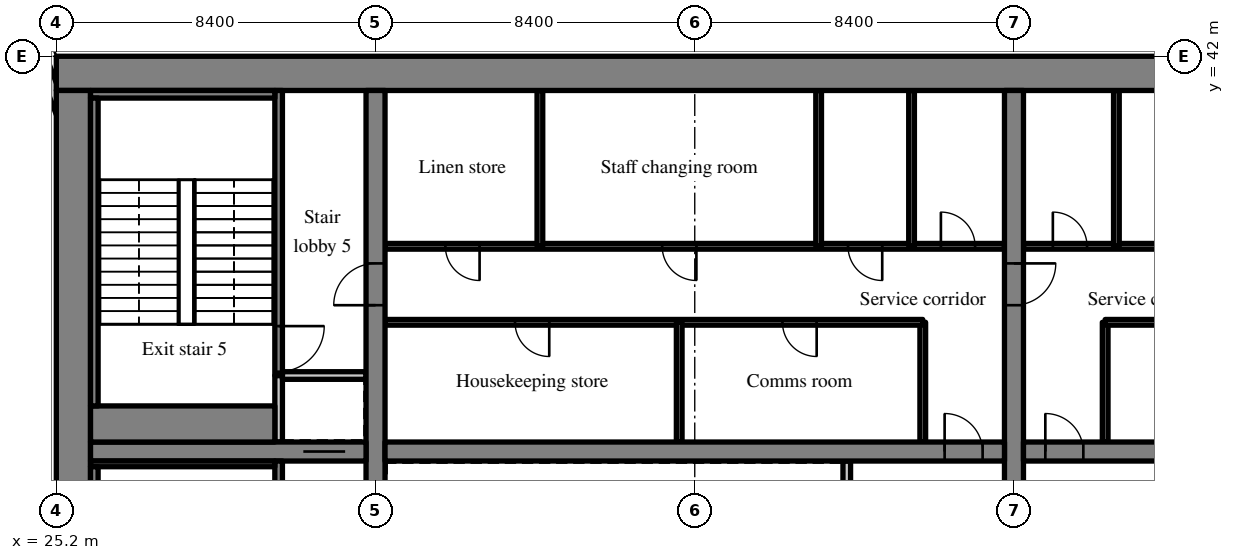
"""IFC4 building model, lengths in metres.
Left out: names, types, materials, properties, quantities, classifications, styles, units other than length and angle.
Written with IfcOpenShell. Run it as: python <this file> out.ifc"""

import sys

from ifc_helpers import new_model, si_unit, direction, frame, frame_2d, origin, place, context, subcontext, project, spatial, rectangle, extrude, source, transform, mapped, element, fill, save


model = new_model("IFC4")
c1 = context("Model", 3, precision=1e-05, world=origin(), true_north=direction((0.0, 1.0)))
c2 = subcontext(c1, "Body", "Model", "MODEL_VIEW")
j1 = project(units=[si_unit("LENGTHUNIT", "METRE"), si_unit("PLANEANGLEUNIT", "RADIAN")], contexts=[c1])
p1 = place(None, origin())
s1 = spatial("IfcSite", under=j1, at=p1, CompositionType="ELEMENT")
p2 = place(p1, origin())
s2 = spatial("IfcBuilding", under=s1, at=p2, CompositionType="ELEMENT")
p3 = place(p2, frame((0.0, 0.0, 99.0)))
s3 = spatial("IfcBuildingStorey", under=s2, at=p3, CompositionType="ELEMENT", Elevation=99.0)
m1 = source(origin(), c2, "Body", "SweptSolid", [
    extrude(rectangle(XDim=50.4, YDim=0.9, at=frame_2d((25.2, 0.0))), origin(), (0.0, 0.0, 1.0), 3.52),
])
p4 = place(p3, frame((25.2, 41.55, 0.0), z_axis=(0.0, 0.0, 1.0), x_axis=(1.0, 0.0, 0.0)))
e1 = element("IfcWall", 1, at=p4, inside=s3, PredefinedType="SHEAR", context=c2, shape_type="MappedRepresentation", body=[
    mapped(m1, transform((0.0, 0.0, 0.0), scale=1.0)),
])
m2 = source(origin(), c2, "Body", "SweptSolid", [
    extrude(rectangle(XDim=18.2, YDim=0.9, at=frame_2d((9.1, 0.0))), origin(), (0.0, 0.0, 1.0), 3.52),
])
p5 = place(p3, frame((25.65, 22.9, 0.0), z_axis=(0.0, 0.0, 1.0), x_axis=(0.0, 1.0, 0.0)))
e2 = element("IfcWall", 2, at=p5, inside=s3, PredefinedType="SHEAR", context=c2, shape_type="MappedRepresentation", body=[
    mapped(m2, transform((0.0, 0.0, 0.0), scale=1.0)),
])
m3 = source(origin(), c2, "Body", "SweptSolid", [
    extrude(rectangle(XDim=18.2, YDim=0.5, at=frame_2d((9.1, 0.0))), origin(), (0.0, 0.0, 1.0), 3.52),
])
p6 = place(p3, frame((33.6, 22.9, 0.0), z_axis=(0.0, 0.0, 1.0), x_axis=(0.0, 1.0, 0.0)))
e3 = element("IfcWall", 3, at=p6, inside=s3, PredefinedType="SHEAR", context=c2, shape_type="MappedRepresentation", body=[
    mapped(m3, transform((0.0, 0.0, 0.0), scale=1.0)),
])
m4 = source(origin(), c2, "Body", "SweptSolid", [
    extrude(rectangle(XDim=1.1, YDim=2.1, at=frame_2d((0.55, 1.05))), frame((0.0, 0.26, 0.0), z_axis=(0.0, -1.0, 0.0), x_axis=(1.0, 0.0, 0.0)), (0.0, 0.0, 1.0), 0.52),
])
p7 = place(p6, frame((12.55, 0.0, 0.0)))
e4 = element("IfcOpeningElement", 4, at=p7, cuts=e3, PredefinedType="OPENING", context=c2, shape_type="MappedRepresentation", body=[
    mapped(m4, transform((0.0, 0.0, 0.0), scale=1.0)),
])
p8 = place(p3, frame((50.4, 22.9, 0.0), z_axis=(0.0, 0.0, 1.0), x_axis=(0.0, 1.0, 0.0)))
e5 = element("IfcWall", 5, at=p8, inside=s3, PredefinedType="SHEAR", context=c2, shape_type="MappedRepresentation", body=[
    mapped(m3, transform((0.0, 0.0, 0.0), scale=1.0)),
])
p9 = place(p8, frame((12.55, 0.0, 0.0)))
e6 = element("IfcOpeningElement", 6, at=p9, cuts=e5, PredefinedType="OPENING", context=c2, shape_type="MappedRepresentation", body=[
    mapped(m4, transform((0.0, 0.0, 0.0), scale=1.0)),
])
m5 = source(origin(), c2, "Body", "SweptSolid", [
    extrude(rectangle(XDim=7.25, YDim=0.5, at=frame_2d((3.625, 0.0))), origin(), (0.0, 0.0, 1.0), 3.52),
])
p10 = place(p3, frame((26.1, 31.6, 0.0), z_axis=(0.0, 0.0, 1.0), x_axis=(1.0, 0.0, 0.0)))
e7 = element("IfcWall", 7, at=p10, inside=s3, PredefinedType="SHEAR", context=c2, shape_type="MappedRepresentation", body=[
    mapped(m5, transform((0.0, 0.0, 0.0), scale=1.0)),
])
p11 = place(p10, frame((5.6, 0.0, 0.0)))
e8 = element("IfcOpeningElement", 8, at=p11, cuts=e7, PredefinedType="OPENING", context=c2, shape_type="MappedRepresentation", body=[
    mapped(m4, transform((0.0, 0.0, 0.0), scale=1.0)),
])
m6 = source(origin(), c2, "Body", "SweptSolid", [
    extrude(rectangle(XDim=16.3, YDim=0.5, at=frame_2d((8.15, 0.0))), origin(), (0.0, 0.0, 1.0), 3.52),
])
p12 = place(p3, frame((33.85, 31.6, 0.0), z_axis=(0.0, 0.0, 1.0), x_axis=(1.0, 0.0, 0.0)))
e9 = element("IfcWall", 9, at=p12, inside=s3, PredefinedType="SHEAR", context=c2, shape_type="MappedRepresentation", body=[
    mapped(m6, transform((0.0, 0.0, 0.0), scale=1.0)),
])
m7 = source(origin(), c2, "Body", "SweptSolid", [
    extrude(rectangle(XDim=1.0, YDim=2.1, at=frame_2d((0.5, 1.05))), frame((0.0, 0.26, 0.0), z_axis=(0.0, -1.0, 0.0), x_axis=(1.0, 0.0, 0.0)), (0.0, 0.0, 1.0), 0.52),
])
p13 = place(p12, frame((14.725, 0.0, 0.0)))
e10 = element("IfcOpeningElement", 10, at=p13, cuts=e9, PredefinedType="OPENING", context=c2, shape_type="MappedRepresentation", body=[
    mapped(m7, transform((0.0, 0.0, 0.0), scale=1.0)),
])
m8 = source(origin(), c2, "Body", "SweptSolid", [
    extrude(rectangle(XDim=16.3, YDim=0.5, at=frame_2d((8.15, 0.0))), origin(), (0.0, 0.0, 1.0), 3.52),
])
p14 = place(p3, frame((50.65, 31.6, 0.0), z_axis=(0.0, 0.0, 1.0), x_axis=(1.0, 0.0, 0.0)))
e11 = element("IfcWall", 11, at=p14, inside=s3, PredefinedType="SHEAR", context=c2, shape_type="MappedRepresentation", body=[
    mapped(m8, transform((0.0, 0.0, 0.0), scale=1.0)),
])
p15 = place(p14, frame((0.575, 0.0, 0.0)))
e12 = element("IfcOpeningElement", 12, at=p15, cuts=e11, PredefinedType="OPENING", context=c2, shape_type="MappedRepresentation", body=[
    mapped(m7, transform((0.0, 0.0, 0.0), scale=1.0)),
])
m9 = source(origin(), c2, "Body", "SweptSolid", [
    extrude(rectangle(XDim=3.559, YDim=0.3, at=frame_2d((1.78, 0.0))), origin(), (0.0, 0.0, 1.0), 3.52),
])
p16 = place(p3, frame((25.55, 39.969, 0.0), z_axis=(0.0, 0.0, 1.0), x_axis=(-0.35779745313, 0.933799219604, 0.0)))
e13 = element("IfcWall", 13, at=p16, inside=s3, PredefinedType="SOLIDWALL", context=c2, shape_type="MappedRepresentation", body=[
    mapped(m9, transform((0.0, 0.0, 0.0), scale=1.0)),
])
m10 = source(origin(), c2, "Body", "SweptSolid", [
    extrude(rectangle(XDim=1.5, YDim=2.0, at=frame_2d((0.75, 1.0))), frame((0.0, 0.16, 0.0), z_axis=(0.0, -1.0, 0.0), x_axis=(1.0, 0.0, 0.0)), (0.0, 0.0, 1.0), 0.32),
])
p17 = place(p16, frame((1.903, 0.0, 0.9)))
e14 = element("IfcOpeningElement", 14, at=p17, cuts=e13, PredefinedType="OPENING", context=c2, shape_type="MappedRepresentation", body=[
    mapped(m10, transform((0.0, 0.0, 0.0), scale=1.0)),
])
m11 = source(origin(), c2, "Body", "SweptSolid", [
    extrude(rectangle(XDim=2.55, YDim=0.2, at=frame_2d((1.275, 0.0))), origin(), (0.0, 0.0, 1.0), 3.52),
])
p18 = place(p3, frame((46.0, 28.8, 0.0), z_axis=(0.0, 0.0, 1.0), x_axis=(0.0, 1.0, 0.0)))
e15 = element("IfcWall", 15, at=p18, inside=s3, PredefinedType="SOLIDWALL", context=c2, shape_type="MappedRepresentation", body=[
    mapped(m11, transform((0.0, 0.0, 0.0), scale=1.0)),
])
m12 = source(origin(), c2, "Body", "SweptSolid", [
    extrude(rectangle(XDim=3.15, YDim=0.15, at=frame_2d((1.575, 0.0))), origin(), (0.0, 0.0, 1.0), 3.52),
])
p19 = place(p3, frame((48.0, 31.85, 0.0), z_axis=(0.0, 0.0, 1.0), x_axis=(0.0, 1.0, 0.0)))
e16 = element("IfcWall", 16, at=p19, inside=s3, PredefinedType="PARTITIONING", context=c2, shape_type="MappedRepresentation", body=[
    mapped(m12, transform((0.0, 0.0, 0.0), scale=1.0)),
])
m13 = source(origin(), c2, "Body", "SweptSolid", [
    extrude(rectangle(XDim=14.15, YDim=0.15, at=frame_2d((7.075, 0.0))), origin(), (0.0, 0.0, 1.0), 3.52),
])
p20 = place(p3, frame((33.85, 35.0, 0.0), z_axis=(0.0, 0.0, 1.0), x_axis=(1.0, 0.0, 0.0)))
e17 = element("IfcWall", 17, at=p20, inside=s3, PredefinedType="PARTITIONING", context=c2, shape_type="MappedRepresentation", body=[
    mapped(m13, transform((0.0, 0.0, 0.0), scale=1.0)),
])
m14 = source(origin(), c2, "Body", "SweptSolid", [
    extrude(rectangle(XDim=0.9, YDim=2.1, at=frame_2d((0.45, 1.05))), frame((0.0, 0.085, 0.0), z_axis=(0.0, -1.0, 0.0), x_axis=(1.0, 0.0, 0.0)), (0.0, 0.0, 1.0), 0.17),
])
p21 = place(p20, frame((3.421, 0.0, 0.0)))
e18 = element("IfcOpeningElement", 18, at=p21, cuts=e17, PredefinedType="OPENING", context=c2, shape_type="MappedRepresentation", body=[
    mapped(m14, transform((0.0, 0.0, 0.0), scale=1.0)),
])
p22 = place(p20, frame((10.458, 0.0, 0.0)))
e19 = element("IfcOpeningElement", 19, at=p22, cuts=e17, PredefinedType="OPENING", context=c2, shape_type="MappedRepresentation", body=[
    mapped(m14, transform((0.0, 0.0, 0.0), scale=1.0)),
])
m15 = source(origin(), c2, "Body", "SweptSolid", [
    extrude(rectangle(XDim=16.3, YDim=0.15, at=frame_2d((8.15, 0.0))), origin(), (0.0, 0.0, 1.0), 3.52),
])
p23 = place(p3, frame((33.85, 37.0, 0.0), z_axis=(0.0, 0.0, 1.0), x_axis=(1.0, 0.0, 0.0)))
e20 = element("IfcWall", 20, at=p23, inside=s3, PredefinedType="PARTITIONING", context=c2, shape_type="MappedRepresentation", body=[
    mapped(m15, transform((0.0, 0.0, 0.0), scale=1.0)),
])
p24 = place(p23, frame((1.588, 0.0, 0.0)))
e21 = element("IfcOpeningElement", 21, at=p24, cuts=e20, PredefinedType="OPENING", context=c2, shape_type="MappedRepresentation", body=[
    mapped(m14, transform((0.0, 0.0, 0.0), scale=1.0)),
])
p25 = place(p23, frame((7.293, 0.0, 0.0)))
e22 = element("IfcOpeningElement", 22, at=p25, cuts=e20, PredefinedType="OPENING", context=c2, shape_type="MappedRepresentation", body=[
    mapped(m14, transform((0.0, 0.0, 0.0), scale=1.0)),
])
p26 = place(p23, frame((12.183, 0.0, 0.0)))
e23 = element("IfcOpeningElement", 23, at=p26, cuts=e20, PredefinedType="OPENING", context=c2, shape_type="MappedRepresentation", body=[
    mapped(m14, transform((0.0, 0.0, 0.0), scale=1.0)),
])
p27 = place(p23, frame((14.627, 0.0, 0.0)))
e24 = element("IfcOpeningElement", 24, at=p27, cuts=e20, PredefinedType="OPENING", context=c2, shape_type="MappedRepresentation", body=[
    mapped(m14, transform((0.0, 0.0, 0.0), scale=1.0)),
])
p28 = place(p3, frame((41.591, 31.85, 0.0), z_axis=(0.0, 0.0, 1.0), x_axis=(0.0, 1.0, 0.0)))
e25 = element("IfcWall", 25, at=p28, inside=s3, PredefinedType="PARTITIONING", context=c2, shape_type="MappedRepresentation", body=[
    mapped(m12, transform((0.0, 0.0, 0.0), scale=1.0)),
])
m16 = source(origin(), c2, "Body", "SweptSolid", [
    extrude(rectangle(XDim=4.1, YDim=0.15, at=frame_2d((2.05, 0.0))), origin(), (0.0, 0.0, 1.0), 3.52),
])
for number, where, z_axis, x_axis in (
    (26, (37.925, 37.0, 0.0), (0.0, 0.0, 1.0), (0.0, 1.0, 0.0)),
    (27, (45.26, 37.0, 0.0), (0.0, 0.0, 1.0), (0.0, 1.0, 0.0)),
    (28, (47.705, 37.0, 0.0), (0.0, 0.0, 1.0), (0.0, 1.0, 0.0)),
):
    element("IfcWall", number, at=place(p3, frame(where, z_axis=z_axis, x_axis=x_axis)), inside=s3, PredefinedType="PARTITIONING", context=c2, shape_type="MappedRepresentation", body=[
        mapped(m16, transform((0.0, 0.0, 0.0), scale=1.0)),
    ])
p29 = place(p3, frame((52.8, 31.85, 0.0), z_axis=(0.0, 0.0, 1.0), x_axis=(0.0, 1.0, 0.0)))
e29 = element("IfcWall", 29, at=p29, inside=s3, PredefinedType="PARTITIONING", context=c2, shape_type="MappedRepresentation", body=[
    mapped(m12, transform((0.0, 0.0, 0.0), scale=1.0)),
])
p30 = place(p3, frame((66.95, 35.0, 0.0), z_axis=(0.0, 0.0, 1.0), x_axis=(-1.0, 0.0, 0.0)))
e30 = element("IfcWall", 30, at=p30, inside=s3, PredefinedType="PARTITIONING", context=c2, shape_type="MappedRepresentation", body=[
    mapped(m13, transform((0.0, 0.0, 0.0), scale=1.0)),
])
p31 = place(p30, frame((6.588, 0.0, 0.0)))
e31 = element("IfcOpeningElement", 31, at=p31, cuts=e30, PredefinedType="OPENING", context=c2, shape_type="MappedRepresentation", body=[
    mapped(m14, transform((0.0, 0.0, 0.0), scale=1.0)),
])
m17 = source(origin(), c2, "Body", "SweptSolid", [
    extrude(rectangle(XDim=16.3, YDim=0.15, at=frame_2d((8.15, 0.0))), origin(), (0.0, 0.0, 1.0), 3.52),
])
p32 = place(p3, frame((66.95, 37.0, 0.0), z_axis=(0.0, 0.0, 1.0), x_axis=(-1.0, 0.0, 0.0)))
e32 = element("IfcWall", 32, at=p32, inside=s3, PredefinedType="PARTITIONING", context=c2, shape_type="MappedRepresentation", body=[
    mapped(m17, transform((0.0, 0.0, 0.0), scale=1.0)),
])
p33 = place(p32, frame((3.218, 0.0, 0.0)))
e33 = element("IfcOpeningElement", 33, at=p33, cuts=e32, PredefinedType="OPENING", context=c2, shape_type="MappedRepresentation", body=[
    mapped(m14, transform((0.0, 0.0, 0.0), scale=1.0)),
])
p34 = place(p32, frame((8.108, 0.0, 0.0)))
e34 = element("IfcOpeningElement", 34, at=p34, cuts=e32, PredefinedType="OPENING", context=c2, shape_type="MappedRepresentation", body=[
    mapped(m14, transform((0.0, 0.0, 0.0), scale=1.0)),
])
p35 = place(p32, frame((11.368, 0.0, 0.0)))
e35 = element("IfcOpeningElement", 35, at=p35, cuts=e32, PredefinedType="OPENING", context=c2, shape_type="MappedRepresentation", body=[
    mapped(m14, transform((0.0, 0.0, 0.0), scale=1.0)),
])
p36 = place(p32, frame((14.627, 0.0, 0.0)))
e36 = element("IfcOpeningElement", 36, at=p36, cuts=e32, PredefinedType="OPENING", context=c2, shape_type="MappedRepresentation", body=[
    mapped(m14, transform((0.0, 0.0, 0.0), scale=1.0)),
])
p37 = place(p3, frame((53.095, 37.0, 0.0), z_axis=(0.0, 0.0, 1.0), x_axis=(0.0, 1.0, 0.0)))
e37 = element("IfcWall", 37, at=p37, inside=s3, PredefinedType="PARTITIONING", context=c2, shape_type="MappedRepresentation", body=[
    mapped(m16, transform((0.0, 0.0, 0.0), scale=1.0)),
])
m18 = source(origin(), c2, "Body", "SweptSolid", [
    extrude(rectangle(XDim=8.45, YDim=0.2, at=frame_2d((4.225, 0.0))), origin(), (0.0, 0.0, 1.0), 3.52),
])
p38 = place(p3, frame((31.05, 22.9, 0.0), z_axis=(0.0, 0.0, 1.0), x_axis=(0.0, 1.0, 0.0)))
e38 = element("IfcWall", 38, at=p38, inside=s3, PredefinedType="SOLIDWALL", context=c2, shape_type="MappedRepresentation", body=[
    mapped(m18, transform((0.0, 0.0, 0.0), scale=1.0)),
])
m19 = source(origin(), c2, "Body", "SweptSolid", [
    extrude(rectangle(XDim=1.2, YDim=2.1, at=frame_2d((0.6, 1.05))), frame((0.0, 0.11, 0.0), z_axis=(0.0, -1.0, 0.0), x_axis=(1.0, 0.0, 0.0)), (0.0, 0.0, 1.0), 0.22),
])
p39 = place(p38, frame((0.7, 0.0, 0.0)))
e39 = element("IfcOpeningElement", 39, at=p39, cuts=e38, PredefinedType="OPENING", context=c2, shape_type="MappedRepresentation", body=[
    mapped(m19, transform((0.0, 0.0, 0.0), scale=1.0)),
])
m20 = source(origin(), c2, "Body", "SweptSolid", [
    extrude(rectangle(XDim=1.75, YDim=0.2, at=frame_2d((0.875, 0.0))), origin(), (0.0, 0.0, 1.0), 3.52),
])
p40 = place(p3, frame((31.05, 31.85, 0.0), z_axis=(0.0, 0.0, 1.0), x_axis=(0.0, 1.0, 0.0)))
e40 = element("IfcWall", 40, at=p40, inside=s3, PredefinedType="SOLIDWALL", context=c2, shape_type="MappedRepresentation", body=[
    mapped(m20, transform((0.0, 0.0, 0.0), scale=1.0)),
])
m21 = source(origin(), c2, "Body", "SweptSolid", [
    extrude(rectangle(XDim=2.2, YDim=0.2, at=frame_2d((1.1, 0.0))), origin(), (0.0, 0.0, 1.0), 3.52),
])
p41 = place(p3, frame((31.15, 33.6, 0.0), z_axis=(0.0, 0.0, 1.0), x_axis=(1.0, 0.0, 0.0)))
e41 = element("IfcWall", 41, at=p41, inside=s3, PredefinedType="SOLIDWALL", context=c2, shape_type="MappedRepresentation", body=[
    mapped(m21, transform((0.0, 0.0, 0.0), scale=1.0)),
])
m22 = source(origin(), c2, "Body", "SweptSolid", [
    extrude(rectangle(XDim=7.5, YDim=0.2, at=frame_2d((3.75, 0.0))), origin(), (0.0, 0.0, 1.0), 3.52),
])
p42 = place(p3, frame((31.05, 33.6, 0.0), z_axis=(0.0, 0.0, 1.0), x_axis=(0.0, 1.0, 0.0)))
e42 = element("IfcWall", 42, at=p42, inside=s3, PredefinedType="SOLIDWALL", context=c2, shape_type="MappedRepresentation", body=[
    mapped(m22, transform((0.0, 0.0, 0.0), scale=1.0)),
])
p43 = place(p42, frame((0.1, 0.0, 0.0)))
e43 = element("IfcOpeningElement", 43, at=p43, cuts=e42, PredefinedType="OPENING", context=c2, shape_type="MappedRepresentation", body=[
    mapped(m19, transform((0.0, 0.0, 0.0), scale=1.0)),
])
m23 = source(origin(), c2, "Body", "SweptSolid", [
    extrude(rectangle(XDim=4.85, YDim=0.15, at=frame_2d((2.425, 0.0))), origin(), (0.0, 0.0, 1.0), 3.52),
])
p44 = place(p3, frame((26.1, 31.275, 0.0), z_axis=(0.0, 0.0, 1.0), x_axis=(1.0, 0.0, 0.0)))
e44 = element("IfcWall", 44, at=p44, inside=s3, PredefinedType="SOLIDWALL", context=c2, shape_type="MappedRepresentation", body=[
    mapped(m23, transform((0.0, 0.0, 0.0), scale=1.0)),
])
m24 = source(origin(), c2, "Body", "SweptSolid", [
    extrude(rectangle(XDim=8.1, YDim=0.2, at=frame_2d((4.05, 0.0))), origin(), (0.0, 0.0, 1.0), 3.52),
])
p45 = place(p3, frame((26.2, 23.1, 0.0), z_axis=(0.0, 0.0, 1.0), x_axis=(0.0, 1.0, 0.0)))
e45 = element("IfcWall", 45, at=p45, inside=s3, PredefinedType="SOLIDWALL", context=c2, shape_type="MappedRepresentation", body=[
    mapped(m24, transform((0.0, 0.0, 0.0), scale=1.0)),
])
m25 = source(origin(), c2, "Body", "SweptSolid", [
    extrude(rectangle(XDim=4.85, YDim=0.2, at=frame_2d((2.425, 0.0))), origin(), (0.0, 0.0, 1.0), 3.52),
])
p46 = place(p3, frame((26.1, 41.0, 0.0), z_axis=(0.0, 0.0, 1.0), x_axis=(1.0, 0.0, 0.0)))
e46 = element("IfcWall", 46, at=p46, inside=s3, PredefinedType="SOLIDWALL", context=c2, shape_type="MappedRepresentation", body=[
    mapped(m25, transform((0.0, 0.0, 0.0), scale=1.0)),
])
m26 = source(origin(), c2, "Body", "SweptSolid", [
    extrude(rectangle(XDim=4.85, YDim=0.95, at=frame_2d((2.425, 0.0))), origin(), (0.0, 0.0, 1.0), 3.52),
])
p47 = place(p3, frame((26.1, 32.325, 0.0), z_axis=(0.0, 0.0, 1.0), x_axis=(1.0, 0.0, 0.0)))
e47 = element("IfcWall", 47, at=p47, inside=s3, PredefinedType="SOLIDWALL", context=c2, shape_type="MappedRepresentation", body=[
    mapped(m26, transform((0.0, 0.0, 0.0), scale=1.0)),
])
p48 = place(p3, frame((26.2, 32.8, 0.0), z_axis=(0.0, 0.0, 1.0), x_axis=(0.0, 1.0, 0.0)))
e48 = element("IfcWall", 48, at=p48, inside=s3, PredefinedType="SOLIDWALL", context=c2, shape_type="MappedRepresentation", body=[
    mapped(m24, transform((0.0, 0.0, 0.0), scale=1.0)),
])
m27 = source(origin(), c2, "Body", "SweptSolid", [
    extrude(rectangle(XDim=1.0, YDim=2.1, at=frame_2d((0.5, 1.05))), frame((0.0, 0.025, 0.0), z_axis=(0.0, -1.0, 0.0), x_axis=(1.0, 0.0, 0.0)), (0.0, 0.0, 1.0), 0.05),
])
p49 = place(p13, origin())
e49 = element("IfcDoor", 49, at=p49, inside=s3, OperationType="SINGLE_SWING_LEFT", PredefinedType="DOOR", context=c2, shape_type="MappedRepresentation", body=[
    mapped(m27, transform((0.0, 0.0, 0.0), scale=1.0)),
])
fill(e10, e49)
m28 = source(origin(), c2, "Body", "SweptSolid", [
    extrude(rectangle(XDim=0.9, YDim=2.1, at=frame_2d((0.45, 1.05))), frame((0.0, 0.025, 0.0), z_axis=(0.0, -1.0, 0.0), x_axis=(1.0, 0.0, 0.0)), (0.0, 0.0, 1.0), 0.05),
])
p50 = place(p21, origin())
e50 = element("IfcDoor", 50, at=p50, inside=s3, OperationType="SINGLE_SWING_RIGHT", PredefinedType="DOOR", context=c2, shape_type="MappedRepresentation", body=[
    mapped(m28, transform((0.0, 0.0, 0.0), scale=1.0)),
])
fill(e18, e50)
p51 = place(p22, origin())
e51 = element("IfcDoor", 51, at=p51, inside=s3, OperationType="SINGLE_SWING_RIGHT", PredefinedType="DOOR", context=c2, shape_type="MappedRepresentation", body=[
    mapped(m28, transform((0.0, 0.0, 0.0), scale=1.0)),
])
fill(e19, e51)
p52 = place(p24, origin())
e52 = element("IfcDoor", 52, at=p52, inside=s3, OperationType="SINGLE_SWING_RIGHT", PredefinedType="DOOR", context=c2, shape_type="MappedRepresentation", body=[
    mapped(m28, transform((0.0, 0.0, 0.0), scale=1.0)),
])
fill(e21, e52)
p53 = place(p25, origin())
e53 = element("IfcDoor", 53, at=p53, inside=s3, OperationType="SINGLE_SWING_RIGHT", PredefinedType="DOOR", context=c2, shape_type="MappedRepresentation", body=[
    mapped(m28, transform((0.0, 0.0, 0.0), scale=1.0)),
])
fill(e22, e53)
p54 = place(p26, origin())
e54 = element("IfcDoor", 54, at=p54, inside=s3, OperationType="SINGLE_SWING_RIGHT", PredefinedType="DOOR", context=c2, shape_type="MappedRepresentation", body=[
    mapped(m28, transform((0.0, 0.0, 0.0), scale=1.0)),
])
fill(e23, e54)
p55 = place(p27, origin())
e55 = element("IfcDoor", 55, at=p55, inside=s3, OperationType="SINGLE_SWING_LEFT", PredefinedType="DOOR", context=c2, shape_type="MappedRepresentation", body=[
    mapped(m28, transform((0.0, 0.0, 0.0), scale=1.0)),
])
fill(e24, e55)
p56 = place(p15, origin())
e56 = element("IfcDoor", 56, at=p56, inside=s3, OperationType="SINGLE_SWING_LEFT", PredefinedType="DOOR", context=c2, shape_type="MappedRepresentation", body=[
    mapped(m27, transform((0.0, 0.0, 0.0), scale=1.0)),
])
fill(e12, e56)
p57 = place(p36, origin())
e57 = element("IfcDoor", 57, at=p57, inside=s3, OperationType="SINGLE_SWING_RIGHT", PredefinedType="DOOR", context=c2, shape_type="MappedRepresentation", body=[
    mapped(m28, transform((0.0, 0.0, 0.0), scale=1.0)),
])
fill(e36, e57)
m29 = source(origin(), c2, "Body", "SweptSolid", [
    extrude(rectangle(XDim=1.1, YDim=2.1, at=frame_2d((0.55, 1.05))), frame((0.0, 0.025, 0.0), z_axis=(0.0, -1.0, 0.0), x_axis=(1.0, 0.0, 0.0)), (0.0, 0.0, 1.0), 0.05),
])
p58 = place(p11, origin())
e58 = element("IfcDoor", 58, at=p58, inside=s3, OperationType="SLIDING_TO_RIGHT", PredefinedType="DOOR", context=c2, shape_type="MappedRepresentation", body=[
    mapped(m29, transform((0.0, 0.0, 0.0), scale=1.0)),
])
fill(e8, e58)
m30 = source(origin(), c2, "Body", "SweptSolid", [
    extrude(rectangle(XDim=1.2, YDim=2.1, at=frame_2d((0.6, 1.05))), frame((0.0, 0.025, 0.0), z_axis=(0.0, -1.0, 0.0), x_axis=(1.0, 0.0, 0.0)), (0.0, 0.0, 1.0), 0.05),
])
p59 = place(p43, origin())
e59 = element("IfcDoor", 59, at=p59, inside=s3, OperationType="SINGLE_SWING_RIGHT", PredefinedType="DOOR", context=c2, shape_type="MappedRepresentation", body=[
    mapped(m30, transform((0.0, 0.0, 0.0), scale=1.0)),
])
fill(e43, e59)
p60 = place(p7, origin())
e60 = element("IfcDoor", 60, at=p60, inside=s3, OperationType="SINGLE_SWING_LEFT", PredefinedType="DOOR", context=c2, shape_type="MappedRepresentation", body=[
    mapped(m29, transform((0.0, 0.0, 0.0), scale=1.0)),
])
fill(e4, e60)
p61 = place(p9, origin())
e61 = element("IfcDoor", 61, at=p61, inside=s3, OperationType="SINGLE_SWING_RIGHT", PredefinedType="DOOR", context=c2, shape_type="MappedRepresentation", body=[
    mapped(m29, transform((0.0, 0.0, 0.0), scale=1.0)),
])
fill(e6, e61)
save(model, sys.argv[1])
